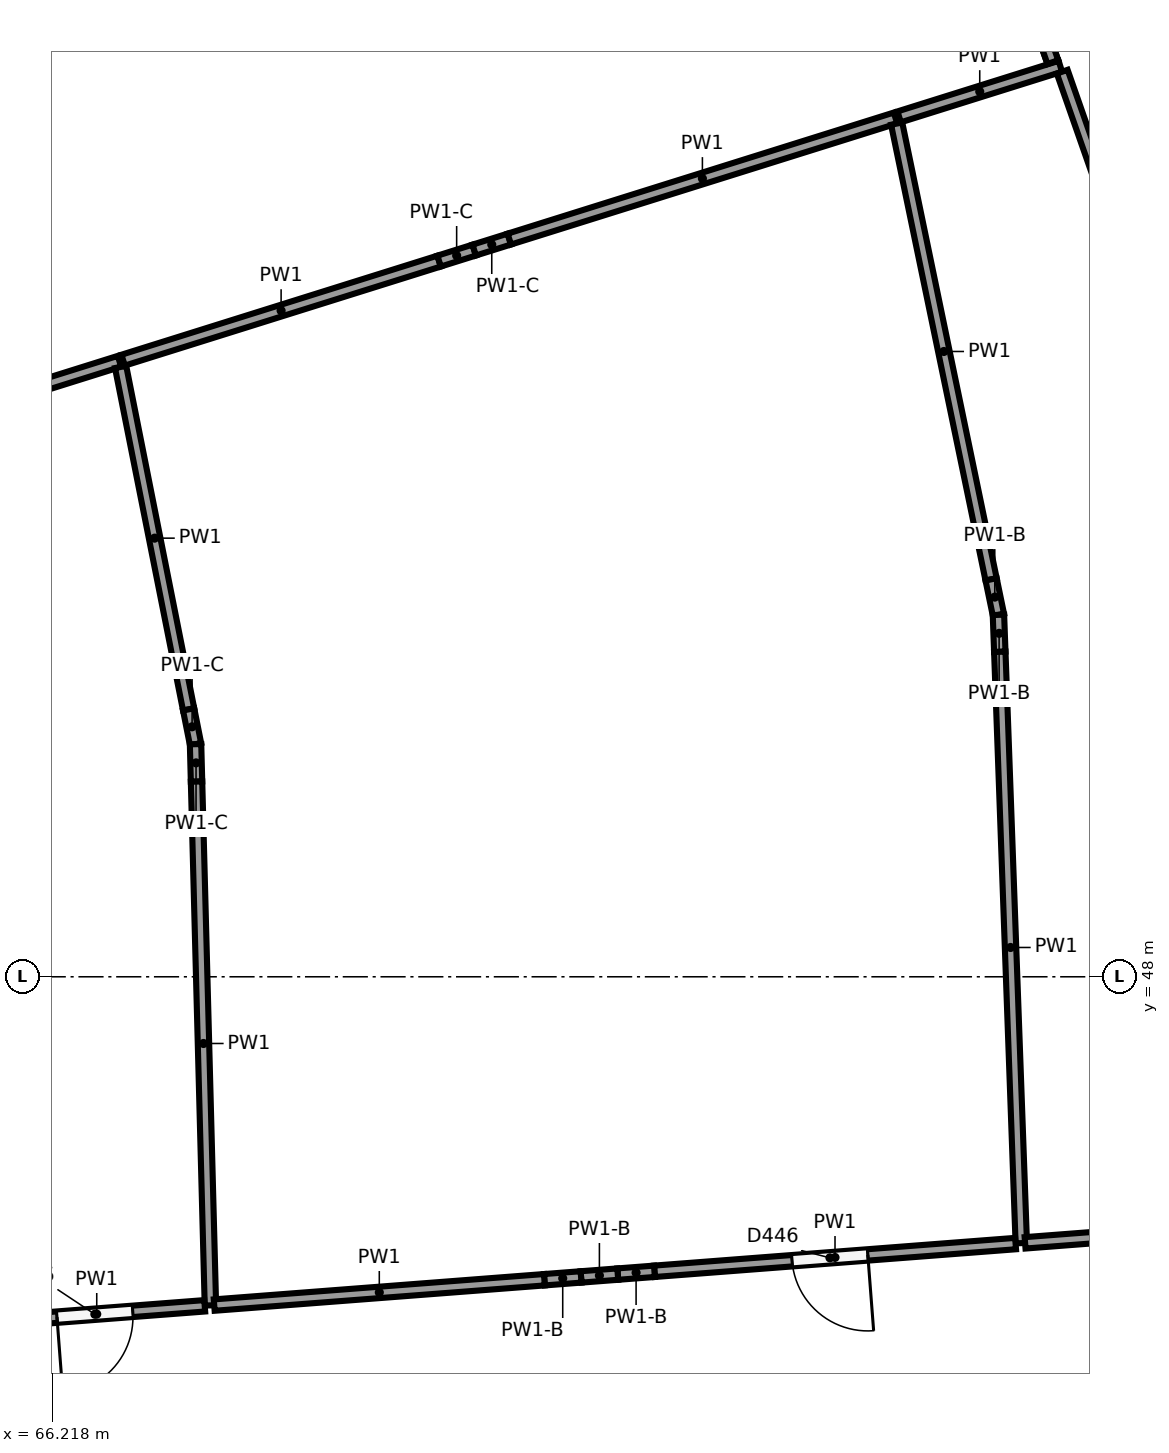
"""IFC4 building model, lengths in metres.
Left out: names, types, materials, properties, quantities, classifications, styles, units other than length and angle.
Written with IfcOpenShell. Run it as: python <this file> out.ifc"""

import sys

from ifc_helpers import new_model, si_unit, direction, frame, frame_2d, origin, origin_2d, place, context, subcontext, project, spatial, rectangle, circle, extrude, element, fill, save


model = new_model("IFC4")
c1 = context("Model", 3, precision=1e-05, world=origin(), true_north=direction((0.0, 1.0)))
c2 = subcontext(c1, "Body", "Model", "MODEL_VIEW")
j1 = project(units=[si_unit("LENGTHUNIT", "METRE"), si_unit("PLANEANGLEUNIT", "RADIAN")], contexts=[c1])
p1 = place(None, origin())
s1 = spatial("IfcSite", under=j1, at=p1, CompositionType="ELEMENT")
p2 = place(p1, origin())
s2 = spatial("IfcBuilding", under=s1, at=p2, CompositionType="ELEMENT")
p3 = place(p2, frame((0.0, 0.0, -4.0)))
s3 = spatial("IfcBuildingStorey", under=s2, at=p3, CompositionType="ELEMENT", Elevation=-4.0)
for number, where, z_axis, x_axis in (
    (1, (72.992, 51.847, -0.4), (0.0, 0.0, 1.0), (1.0, 0.0, 0.0)),
    (2, (71.17, 59.677, -0.4), (0.0, 0.0, 1.0), (1.0, 0.0, 0.0)),
):
    element("IfcColumn", number, at=place(p3, frame(where, z_axis=z_axis, x_axis=x_axis)), inside=s3, PredefinedType="COLUMN", context=c2, shape_type="SweptSolid", body=[
        extrude(circle(Radius=0.45, at=origin_2d()), origin(), (0.0, 0.0, 1.0), 4.4),
    ])
p4 = place(p3, frame((63.848, 55.076, 0.0), z_axis=(0.0, 0.0, 1.0), x_axis=(0.954190550933, 0.299199586414, 0.0)))
e3 = element("IfcWall", 3, at=p4, inside=s3, PredefinedType="PARTITIONING", context=c2, shape_type="SweptSolid", body=[
    extrude(rectangle(XDim=3.412, YDim=0.15, at=frame_2d((1.706, 0.0))), origin(), (0.0, 0.0, 1.0), 3.6),
])
p5 = place(p3, frame((67.119, 56.023, 0.0), z_axis=(0.0, 0.0, 1.0), x_axis=(0.194807566784, -0.980841481547, 0.0)))
e4 = element("IfcWall", 4, at=p5, inside=s3, PredefinedType="PARTITIONING", context=c2, shape_type="SweptSolid", body=[
    extrude(rectangle(XDim=4.593, YDim=0.15, at=frame_2d((2.296, 0.0))), origin(), (0.0, 0.0, 1.0), 3.6),
])
p6 = place(p3, frame((68.014, 51.518, 0.0), z_axis=(0.0, 0.0, 1.0), x_axis=(0.195010055253, -0.980801243041, 0.0)))
e5 = element("IfcWall", 5, at=p6, inside=s3, PredefinedType="PARTITIONING", context=c2, shape_type="SweptSolid", body=[
    extrude(rectangle(XDim=0.467, YDim=0.15, at=frame_2d((0.233, 0.0))), origin(), (0.0, 0.0, 1.0), 2.7),
])
p7 = place(p3, frame((68.105, 51.06, 0.0), z_axis=(0.0, 0.0, 1.0), x_axis=(0.026280602223, -0.999654605325, 0.0)))
e6 = element("IfcWall", 6, at=p7, inside=s3, PredefinedType="PARTITIONING", context=c2, shape_type="SweptSolid", body=[
    extrude(rectangle(XDim=0.492, YDim=0.15, at=frame_2d((0.246, 0.0))), origin(), (0.0, 0.0, 1.0), 2.7),
])
p8 = place(p3, frame((68.118, 50.568, 0.0), z_axis=(0.0, 0.0, 1.0), x_axis=(0.026492027296, -0.999649024653, 0.0)))
e7 = element("IfcWall", 7, at=p8, inside=s3, PredefinedType="PARTITIONING", context=c2, shape_type="SweptSolid", body=[
    extrude(rectangle(XDim=6.893, YDim=0.15, at=frame_2d((3.447, 0.0))), origin(), (0.0, 0.0, 1.0), 3.6),
])
p9 = place(p3, frame((68.226, 43.671, 0.0), z_axis=(0.0, 0.0, 1.0), x_axis=(-0.997069583708, -0.076499968919, 0.0)))
e8 = element("IfcWall", 8, at=p9, inside=s3, PredefinedType="PARTITIONING", context=c2, shape_type="SweptSolid", body=[
    extrude(rectangle(XDim=2.85, YDim=0.15, at=frame_2d((1.425, 0.0))), origin(), (0.0, 0.0, 1.0), 3.6),
])
p10 = place(p9, frame((0.95, 0.0, 0.0)))
e9 = element("IfcOpeningElement", 9, at=p10, cuts=e8, PredefinedType="OPENING", context=c2, shape_type="SweptSolid", body=[
    extrude(rectangle(XDim=1.0, YDim=2.1, at=frame_2d((0.5, 1.05))), frame((0.0, 0.085, 0.0), z_axis=(0.0, -1.0, 0.0), x_axis=(1.0, 0.0, 0.0)), (0.0, 0.0, 1.0), 0.17),
])
p11 = place(p3, frame((67.152, 56.112, 0.0), z_axis=(0.0, 0.0, 1.0), x_axis=(0.954196372084, 0.299181021292, 0.0)))
e10 = element("IfcWall", 10, at=p11, inside=s3, PredefinedType="PARTITIONING", context=c2, shape_type="SweptSolid", body=[
    extrude(rectangle(XDim=4.357, YDim=0.15, at=frame_2d((2.178, 0.0))), origin(), (0.0, 0.0, 1.0), 3.6),
])
for number, where, z_axis, x_axis in (
    (11, (71.31, 57.416, 0.0), (0.0, 0.0, 1.0), (0.954, 0.299, 0.0)),
    (12, (71.771, 57.56, 0.0), (0.0, 0.0, 1.0), (0.954, 0.299, 0.0)),
):
    element("IfcWall", number, at=place(p3, frame(where, z_axis=z_axis, x_axis=x_axis)), inside=s3, PredefinedType="PARTITIONING", context=c2, shape_type="SweptSolid", body=[
        extrude(rectangle(XDim=0.484, YDim=0.15, at=frame_2d((0.242, 0.0))), origin(), (0.0, 0.0, 1.0), 2.7),
    ])
p12 = place(p3, frame((72.233, 57.705, 0.0), z_axis=(0.0, 0.0, 1.0), x_axis=(0.954189100371, 0.299204212426, 0.0)))
e13 = element("IfcWall", 13, at=p12, inside=s3, PredefinedType="PARTITIONING", context=c2, shape_type="SweptSolid", body=[
    extrude(rectangle(XDim=5.325, YDim=0.15, at=frame_2d((2.663, 0.0))), origin(), (0.0, 0.0, 1.0), 3.6),
])
p13 = place(p3, frame((77.33, 59.225, 0.0), z_axis=(0.0, 0.0, 1.0), x_axis=(0.20289695764, -0.979200094251, 0.0)))
e14 = element("IfcWall", 14, at=p13, inside=s3, PredefinedType="PARTITIONING", context=c2, shape_type="SweptSolid", body=[
    extrude(rectangle(XDim=6.124, YDim=0.15, at=frame_2d((3.062, 0.0))), origin(), (0.0, 0.0, 1.0), 3.6),
])
p14 = place(p3, frame((78.572, 53.229, 0.0), z_axis=(0.0, 0.0, 1.0), x_axis=(0.20270716315, -0.979239401785, 0.0)))
e15 = element("IfcWall", 15, at=p14, inside=s3, PredefinedType="PARTITIONING", context=c2, shape_type="SweptSolid", body=[
    extrude(rectangle(XDim=0.477, YDim=0.15, at=frame_2d((0.239, 0.0))), origin(), (0.0, 0.0, 1.0), 2.5),
])
p15 = place(p3, frame((78.669, 52.761, 0.0), z_axis=(0.0, 0.0, 1.0), x_axis=(0.036622003428, -0.999329189439, 0.0)))
e16 = element("IfcWall", 16, at=p15, inside=s3, PredefinedType="PARTITIONING", context=c2, shape_type="SweptSolid", body=[
    extrude(rectangle(XDim=0.487, YDim=0.15, at=frame_2d((0.243, 0.0))), origin(), (0.0, 0.0, 1.0), 2.5),
])
p16 = place(p3, frame((78.687, 52.275, 0.0), z_axis=(0.0, 0.0, 1.0), x_axis=(0.036317977956, -0.999340284626, 0.0)))
e17 = element("IfcWall", 17, at=p16, inside=s3, PredefinedType="PARTITIONING", context=c2, shape_type="SweptSolid", body=[
    extrude(rectangle(XDim=7.784, YDim=0.15, at=frame_2d((3.892, 0.0))), origin(), (0.0, 0.0, 1.0), 3.6),
])
p17 = place(p3, frame((78.895, 44.49, 0.0), z_axis=(0.0, 0.0, 1.0), x_axis=(-0.997066827754, -0.076535880423, 0.0)))
e18 = element("IfcWall", 18, at=p17, inside=s3, PredefinedType="PARTITIONING", context=c2, shape_type="SweptSolid", body=[
    extrude(rectangle(XDim=4.766, YDim=0.15, at=frame_2d((2.383, 0.0))), origin(), (0.0, 0.0, 1.0), 3.6),
])
p18 = place(p17, frame((1.95, 0.0, 0.0)))
e19 = element("IfcOpeningElement", 19, at=p18, cuts=e18, PredefinedType="OPENING", context=c2, shape_type="SweptSolid", body=[
    extrude(rectangle(XDim=1.0, YDim=2.1, at=frame_2d((0.5, 1.05))), frame((0.0, 0.085, 0.0), z_axis=(0.0, -1.0, 0.0), x_axis=(1.0, 0.0, 0.0)), (0.0, 0.0, 1.0), 0.17),
])
for number, where, z_axis, x_axis in (
    (20, (74.143, 44.125, 0.0), (0.0, 0.0, 1.0), (-0.997, -0.076, 0.0)),
    (21, (73.66, 44.088, 0.0), (0.0, 0.0, 1.0), (-0.997, -0.077, 0.0)),
    (22, (73.177, 44.051, 0.0), (0.0, 0.0, 1.0), (-0.997, -0.077, 0.0)),
):
    element("IfcWall", number, at=place(p3, frame(where, z_axis=z_axis, x_axis=x_axis)), inside=s3, PredefinedType="PARTITIONING", context=c2, shape_type="SweptSolid", body=[
        extrude(rectangle(XDim=0.484, YDim=0.15, at=frame_2d((0.242, 0.0))), origin(), (0.0, 0.0, 1.0), 2.5),
    ])
p19 = place(p3, frame((72.695, 44.014, 0.0), z_axis=(0.0, 0.0, 1.0), x_axis=(-0.997070286559, -0.076490807686, 0.0)))
e23 = element("IfcWall", 23, at=p19, inside=s3, PredefinedType="PARTITIONING", context=c2, shape_type="SweptSolid", body=[
    extrude(rectangle(XDim=4.357, YDim=0.15, at=frame_2d((2.178, 0.0))), origin(), (0.0, 0.0, 1.0), 3.6),
])
p20 = place(p3, frame((77.362, 59.313, 0.0), z_axis=(0.0, 0.0, 1.0), x_axis=(0.954198139725, 0.299175383588, 0.0)))
e24 = element("IfcWall", 24, at=p20, inside=s3, PredefinedType="PARTITIONING", context=c2, shape_type="SweptSolid", body=[
    extrude(rectangle(XDim=2.223, YDim=0.15, at=frame_2d((1.111, 0.0))), origin(), (0.0, 0.0, 1.0), 3.6),
])
p21 = place(p3, frame((79.508, 59.907, 0.0), z_axis=(0.0, 0.0, 1.0), x_axis=(0.330291692253, -0.943878910681, 0.0)))
e25 = element("IfcWall", 25, at=p21, inside=s3, PredefinedType="PARTITIONING", context=c2, shape_type="SweptSolid", body=[
    extrude(rectangle(XDim=5.185, YDim=0.15, at=frame_2d((2.592, 0.0))), origin(), (0.0, 0.0, 1.0), 3.6),
])
p22 = place(p3, frame((81.325, 44.677, 0.0), z_axis=(0.0, 0.0, 1.0), x_axis=(-0.997066273449, -0.076543101255, 0.0)))
e26 = element("IfcWall", 26, at=p22, inside=s3, PredefinedType="PARTITIONING", context=c2, shape_type="SweptSolid", body=[
    extrude(rectangle(XDim=2.312, YDim=0.15, at=frame_2d((1.156, 0.0))), origin(), (0.0, 0.0, 1.0), 3.6),
])
p23 = place(p3, frame((77.983, 64.039, 0.0), z_axis=(0.0, 0.0, 1.0), x_axis=(0.330276109597, -0.943884363378, 0.0)))
e27 = element("IfcWall", 27, at=p23, inside=s3, PredefinedType="PARTITIONING", context=c2, shape_type="SweptSolid", body=[
    extrude(rectangle(XDim=4.244, YDim=0.15, at=frame_2d((2.122, 0.0))), origin(), (0.0, 0.0, 1.0), 2.5),
])
p24 = place(p3, frame((78.91, 61.389, 2.5), z_axis=(0.0, 0.0, 1.0), x_axis=(0.330221659301, -0.943903414407, 0.0)))
e28 = element("IfcWall", 28, at=p24, inside=s3, PredefinedType="PARTITIONING", context=c2, shape_type="SweptSolid", body=[
    extrude(rectangle(XDim=1.436, YDim=0.15, at=frame_2d((0.718, 0.0))), origin(), (0.0, 0.0, 1.0), 1.1),
])
p25 = place(p10, origin())
e29 = element("IfcDoor", 29, at=p25, inside=s3, OperationType="SINGLE_SWING_RIGHT", PredefinedType="DOOR", context=c2, shape_type="SweptSolid", body=[
    extrude(rectangle(XDim=1.0, YDim=2.1, at=frame_2d((0.5, 1.05))), frame((0.0, 0.025, 0.0), z_axis=(0.0, -1.0, 0.0), x_axis=(1.0, 0.0, 0.0)), (0.0, 0.0, 1.0), 0.05),
])
fill(e9, e29)
p26 = place(p18, origin())
e30 = element("IfcDoor", 30, at=p26, inside=s3, OperationType="SINGLE_SWING_LEFT", PredefinedType="DOOR", context=c2, shape_type="SweptSolid", body=[
    extrude(rectangle(XDim=1.0, YDim=2.1, at=frame_2d((0.5, 1.05))), frame((0.0, 0.025, 0.0), z_axis=(0.0, -1.0, 0.0), x_axis=(1.0, 0.0, 0.0)), (0.0, 0.0, 1.0), 0.05),
])
fill(e19, e30)
save(model, sys.argv[1])
